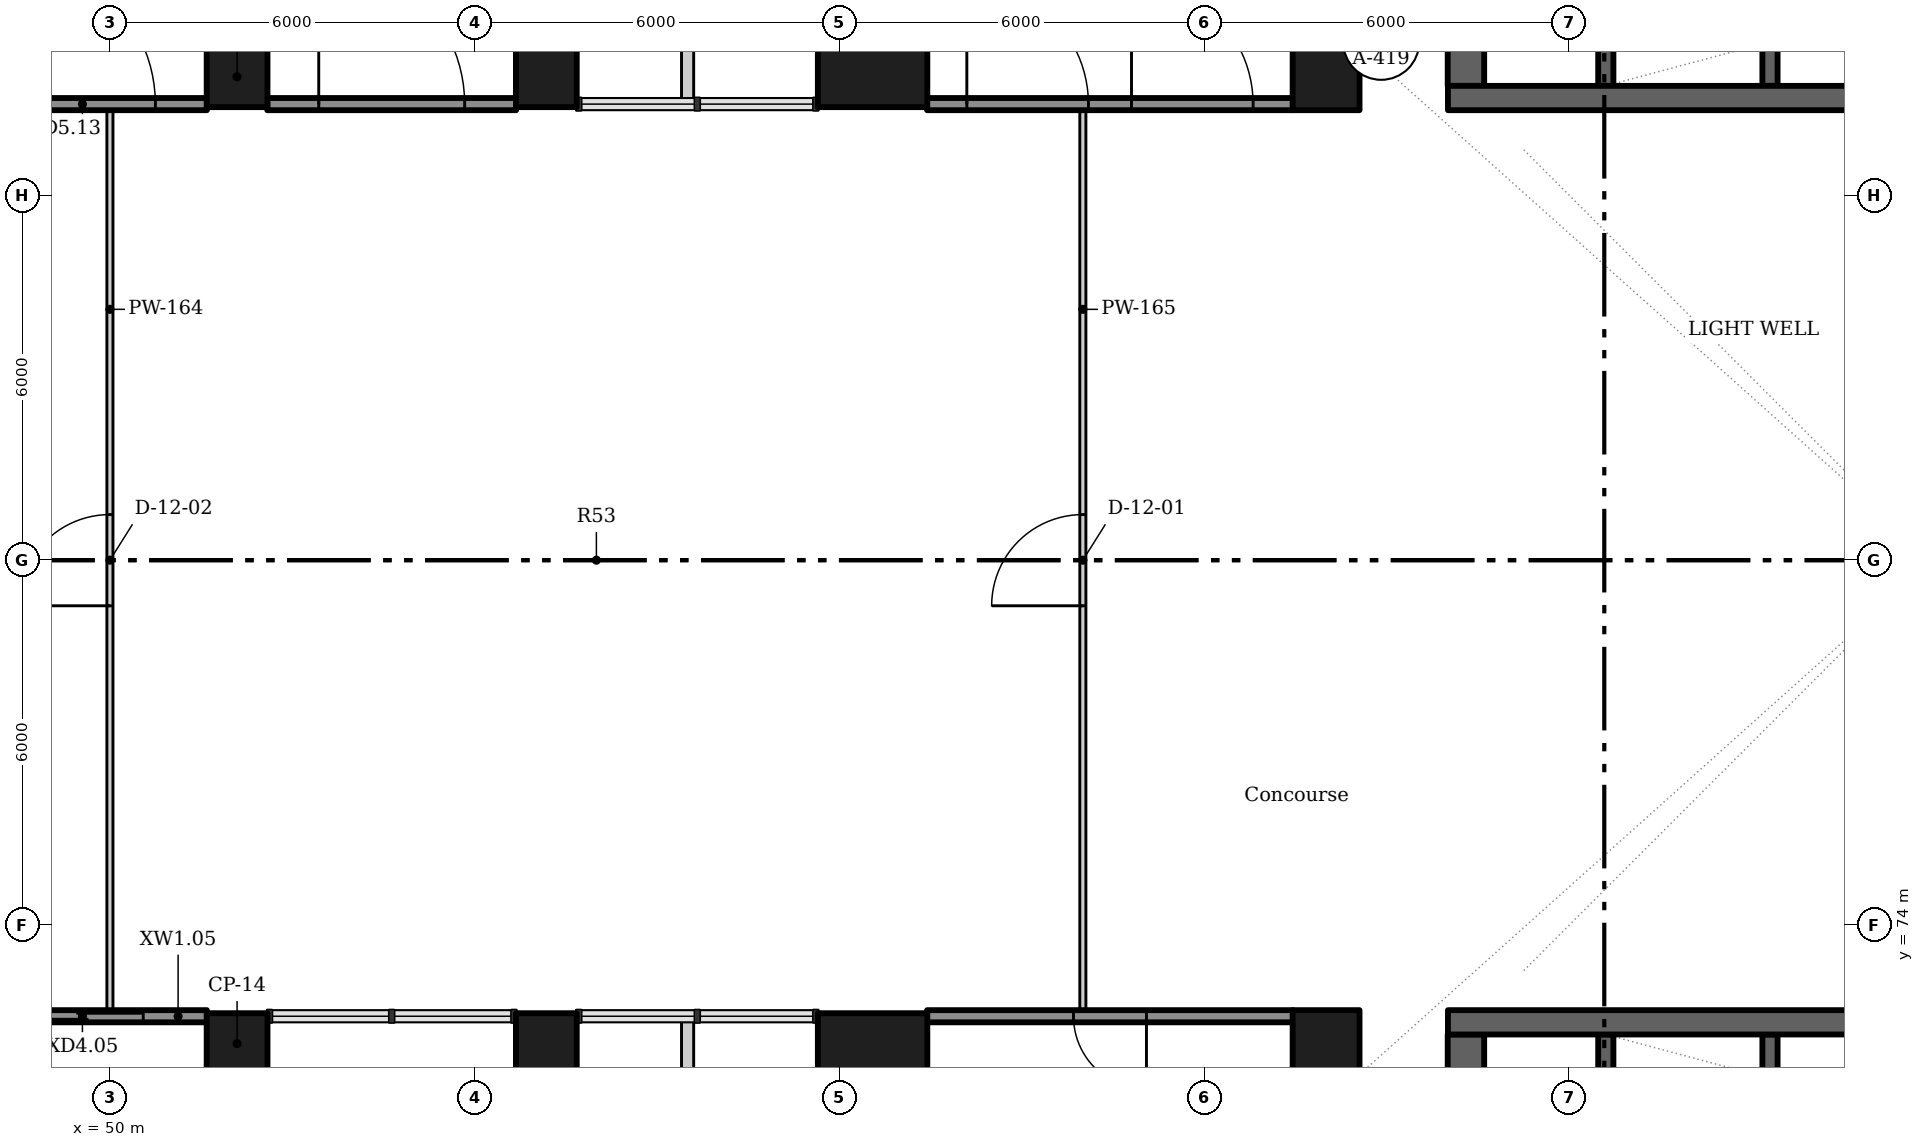
"""IFC4 building model, lengths in metres.
Left out: names, types, materials, properties, quantities, classifications, styles, units other than length and angle.
Written with IfcOpenShell. Run it as: python <this file> out.ifc"""

import sys

from ifc_helpers import new_model, si_unit, direction, frame, frame_2d, origin, origin_2d, place, context, subcontext, project, spatial, rectangle, extrude, element, fill, save


model = new_model("IFC4")
c1 = context("Model", 3, precision=1e-05, world=origin(), true_north=direction((0.0, 1.0)))
c2 = subcontext(c1, "Body", "Model", "MODEL_VIEW")
j1 = project(units=[si_unit("LENGTHUNIT", "METRE"), si_unit("PLANEANGLEUNIT", "RADIAN")], contexts=[c1])
p1 = place(None, origin())
s1 = spatial("IfcSite", under=j1, at=p1, CompositionType="ELEMENT")
p2 = place(p1, origin())
s2 = spatial("IfcBuilding", under=s1, at=p2, CompositionType="ELEMENT")
p3 = place(p2, origin())
s3 = spatial("IfcBuildingStorey", under=s2, at=p3, CompositionType="ELEMENT", Elevation=0.0)
for number, where, z_axis, x_axis in (
    (1, (70.0, 87.95, -1.8), (0.0, 0.0, 1.0), (0.0, -1.0, 0.0)),
    (2, (70.0, 72.05, -1.8), (0.0, 0.0, 1.0), (0.0, -1.0, 0.0)),
):
    element("IfcColumn", number, at=place(p3, frame(where, z_axis=z_axis, x_axis=x_axis)), inside=s3, PredefinedType="COLUMN", context=c2, shape_type="SweptSolid", body=[
        extrude(rectangle(XDim=1.1, YDim=1.1, at=origin_2d()), origin(), (0.0, 0.0, 1.0), 8.4),
    ])
for number, where, z_axis, x_axis in (
    (3, (62.542, 87.95, -1.8), (0.0, 0.0, 1.0), (1.0, 0.0, 0.0)),
    (4, (62.542, 72.05, -1.8), (0.0, 0.0, 1.0), (1.0, 0.0, 0.0)),
):
    element("IfcColumn", number, at=place(p3, frame(where, z_axis=z_axis, x_axis=x_axis)), inside=s3, PredefinedType="COLUMN", context=c2, shape_type="SweptSolid", body=[
        extrude(rectangle(XDim=1.8, YDim=1.0, at=origin_2d()), origin(), (0.0, 0.0, 1.0), 8.4),
    ])
for number, where, z_axis, x_axis in (
    (5, (57.177, 87.95, -1.8), (0.0, 0.0, 1.0), (1.0, 0.0, 0.0)),
    (6, (57.177, 72.05, -1.8), (0.0, 0.0, 1.0), (1.0, 0.0, 0.0)),
    (7, (52.091, 87.95, -1.8), (0.0, 0.0, 1.0), (1.0, 0.0, 0.0)),
    (8, (52.091, 72.05, -1.8), (0.0, 0.0, 1.0), (1.0, 0.0, 0.0)),
):
    element("IfcColumn", number, at=place(p3, frame(where, z_axis=z_axis, x_axis=x_axis)), inside=s3, PredefinedType="COLUMN", context=c2, shape_type="SweptSolid", body=[
        extrude(rectangle(XDim=1.0, YDim=1.0, at=origin_2d()), origin(), (0.0, 0.0, 1.0), 8.4),
    ])
p4 = place(p3, frame((69.454, 72.5, 0.0), z_axis=(0.0, 0.0, 1.0), x_axis=(-1.0, 0.0, 0.0)))
e9 = element("IfcWall", 9, at=p4, inside=s3, PredefinedType="SOLIDWALL", context=c2, shape_type="SweptSolid", body=[
    extrude(rectangle(XDim=6.016, YDim=0.2, at=frame_2d((3.008, 0.0))), origin(), (0.0, 0.0, 1.0), 5.4),
])
p5 = place(p4, frame((2.408, 0.0, 0.0)))
e10 = element("IfcOpeningElement", 10, at=p5, cuts=e9, PredefinedType="OPENING", context=c2, shape_type="SweptSolid", body=[
    extrude(rectangle(XDim=1.2, YDim=2.4, at=frame_2d((0.6, 1.2))), frame((0.0, 0.11, 0.0), z_axis=(0.0, -1.0, 0.0), x_axis=(1.0, 0.0, 0.0)), (0.0, 0.0, 1.0), 0.22),
])
p6 = place(p3, frame((51.595, 72.5, 0.0), z_axis=(0.0, 0.0, 1.0), x_axis=(-1.0, 0.0, 0.0)))
e11 = element("IfcWall", 11, at=p6, inside=s3, PredefinedType="SOLIDWALL", context=c2, shape_type="SweptSolid", body=[
    extrude(rectangle(XDim=4.095, YDim=0.2, at=frame_2d((2.047, 0.0))), origin(), (0.0, 0.0, 1.0), 5.4),
])
p7 = place(p6, frame((1.048, 0.0, 0.0)))
e12 = element("IfcOpeningElement", 12, at=p7, cuts=e11, PredefinedType="OPENING", context=c2, shape_type="SweptSolid", body=[
    extrude(rectangle(XDim=2.0, YDim=3.0, at=frame_2d((1.0, 1.5))), frame((0.0, 0.11, 0.0), z_axis=(0.0, -1.0, 0.0), x_axis=(1.0, 0.0, 0.0)), (0.0, 0.0, 1.0), 0.22),
])
p8 = place(p3, frame((47.5, 87.5, 0.0), z_axis=(0.0, 0.0, 1.0), x_axis=(1.0, 0.0, 0.0)))
e13 = element("IfcWall", 13, at=p8, inside=s3, PredefinedType="SOLIDWALL", context=c2, shape_type="SweptSolid", body=[
    extrude(rectangle(XDim=4.095, YDim=0.2, at=frame_2d((2.047, 0.0))), origin(), (0.0, 0.0, 1.0), 5.4),
])
p9 = place(p8, frame((0.847, 0.0, 0.0)))
e14 = element("IfcOpeningElement", 14, at=p9, cuts=e13, PredefinedType="OPENING", context=c2, shape_type="SweptSolid", body=[
    extrude(rectangle(XDim=2.4, YDim=2.7, at=frame_2d((1.2, 1.35))), frame((0.0, 0.11, 0.0), z_axis=(0.0, -1.0, 0.0), x_axis=(1.0, 0.0, 0.0)), (0.0, 0.0, 1.0), 0.22),
])
p10 = place(p3, frame((52.587, 87.5, 0.0), z_axis=(0.0, 0.0, 1.0), x_axis=(1.0, 0.0, 0.0)))
e15 = element("IfcWall", 15, at=p10, inside=s3, PredefinedType="SOLIDWALL", context=c2, shape_type="SweptSolid", body=[
    extrude(rectangle(XDim=4.094, YDim=0.2, at=frame_2d((2.047, 0.0))), origin(), (0.0, 0.0, 1.0), 5.4),
])
p11 = place(p10, frame((0.847, 0.0, 0.0)))
e16 = element("IfcOpeningElement", 16, at=p11, cuts=e15, PredefinedType="OPENING", context=c2, shape_type="SweptSolid", body=[
    extrude(rectangle(XDim=2.4, YDim=2.7, at=frame_2d((1.2, 1.35))), frame((0.0, 0.11, 0.0), z_axis=(0.0, -1.0, 0.0), x_axis=(1.0, 0.0, 0.0)), (0.0, 0.0, 1.0), 0.22),
])
p12 = place(p3, frame((63.438, 87.5, 0.0), z_axis=(0.0, 0.0, 1.0), x_axis=(1.0, 0.0, 0.0)))
e17 = element("IfcWall", 17, at=p12, inside=s3, PredefinedType="SOLIDWALL", context=c2, shape_type="SweptSolid", body=[
    extrude(rectangle(XDim=6.016, YDim=0.2, at=frame_2d((3.008, 0.0))), origin(), (0.0, 0.0, 1.0), 5.4),
])
p13 = place(p12, frame((0.654, 0.0, 0.0)))
e18 = element("IfcOpeningElement", 18, at=p13, cuts=e17, PredefinedType="OPENING", context=c2, shape_type="SweptSolid", body=[
    extrude(rectangle(XDim=2.0, YDim=2.4, at=frame_2d((1.0, 1.2))), frame((0.0, 0.11, 0.0), z_axis=(0.0, -1.0, 0.0), x_axis=(1.0, 0.0, 0.0)), (0.0, 0.0, 1.0), 0.22),
])
p14 = place(p12, frame((3.362, 0.0, 0.0)))
e19 = element("IfcOpeningElement", 19, at=p14, cuts=e17, PredefinedType="OPENING", context=c2, shape_type="SweptSolid", body=[
    extrude(rectangle(XDim=2.0, YDim=2.4, at=frame_2d((1.0, 1.2))), frame((0.0, 0.11, 0.0), z_axis=(0.0, -1.0, 0.0), x_axis=(1.0, 0.0, 0.0)), (0.0, 0.0, 1.0), 0.22),
])
p15 = place(p3, frame((74.6, 87.8, -1.8), z_axis=(0.0, 0.0, 1.0), x_axis=(0.0, 1.0, 0.0)))
e20 = element("IfcWall", 20, at=p15, inside=s3, PredefinedType="SHEAR", context=c2, shape_type="SweptSolid", body=[
    extrude(rectangle(XDim=2.9, YDim=0.25, at=frame_2d((1.45, 0.0))), origin(), (0.0, 0.0, 1.0), 8.1),
])
p16 = place(p3, frame((72.3, 96.9, -1.8), z_axis=(0.0, 0.0, 1.0), x_axis=(0.0, -1.0, 0.0)))
e21 = element("IfcWall", 21, at=p16, inside=s3, PredefinedType="SHEAR", context=c2, shape_type="SweptSolid", body=[
    extrude(rectangle(XDim=9.1, YDim=0.6, at=frame_2d((4.55, 0.0))), origin(), (0.0, 0.0, 1.0), 8.1),
])
p17 = place(p16, frame((0.85, 0.0, 1.8)))
e22 = element("IfcOpeningElement", 22, at=p17, cuts=e21, PredefinedType="OPENING", context=c2, shape_type="SweptSolid", body=[
    extrude(rectangle(XDim=1.1, YDim=2.1, at=frame_2d((0.55, 1.05))), frame((0.0, 0.31, 0.0), z_axis=(0.0, -1.0, 0.0), x_axis=(1.0, 0.0, 0.0)), (0.0, 0.0, 1.0), 0.62),
])
for number, where, z_axis, x_axis in (
    (23, (77.3, 87.8, -1.8), (0.0, 0.0, 1.0), (0.0, 1.0, 0.0)),
    (24, (74.6, 69.3, -1.8), (0.0, 0.0, 1.0), (0.0, 1.0, 0.0)),
):
    element("IfcWall", number, at=place(p3, frame(where, z_axis=z_axis, x_axis=x_axis)), inside=s3, PredefinedType="SHEAR", context=c2, shape_type="SweptSolid", body=[
        extrude(rectangle(XDim=2.9, YDim=0.25, at=frame_2d((1.45, 0.0))), origin(), (0.0, 0.0, 1.0), 8.1),
    ])
p18 = place(p3, frame((72.3, 72.2, -1.8), z_axis=(0.0, 0.0, 1.0), x_axis=(0.0, -1.0, 0.0)))
e25 = element("IfcWall", 25, at=p18, inside=s3, PredefinedType="SHEAR", context=c2, shape_type="SweptSolid", body=[
    extrude(rectangle(XDim=9.1, YDim=0.6, at=frame_2d((4.55, 0.0))), origin(), (0.0, 0.0, 1.0), 8.1),
])
p19 = place(p18, frame((7.15, 0.0, 1.8)))
e26 = element("IfcOpeningElement", 26, at=p19, cuts=e25, PredefinedType="OPENING", context=c2, shape_type="SweptSolid", body=[
    extrude(rectangle(XDim=1.1, YDim=2.1, at=frame_2d((0.55, 1.05))), frame((0.0, 0.31, 0.0), z_axis=(0.0, -1.0, 0.0), x_axis=(1.0, 0.0, 0.0)), (0.0, 0.0, 1.0), 0.62),
])
p20 = place(p18, frame((3.85, 0.0, 1.8)))
e27 = element("IfcOpeningElement", 27, at=p20, cuts=e25, PredefinedType="OPENING", context=c2, shape_type="SweptSolid", body=[
    extrude(rectangle(XDim=1.5, YDim=2.1, at=frame_2d((0.75, 1.05))), frame((0.0, 0.31, 0.0), z_axis=(0.0, -1.0, 0.0), x_axis=(1.0, 0.0, 0.0)), (0.0, 0.0, 1.0), 0.62),
])
p21 = place(p3, frame((77.3, 69.3, -1.8), z_axis=(0.0, 0.0, 1.0), x_axis=(0.0, 1.0, 0.0)))
e28 = element("IfcWall", 28, at=p21, inside=s3, PredefinedType="SHEAR", context=c2, shape_type="SweptSolid", body=[
    extrude(rectangle(XDim=2.9, YDim=0.25, at=frame_2d((1.45, 0.0))), origin(), (0.0, 0.0, 1.0), 8.1),
])
p22 = place(p3, frame((59.5, 72.42, 0.0), z_axis=(0.0, 0.0, 1.0), x_axis=(0.0, -1.0, 0.0)))
e29 = element("IfcWall", 29, at=p22, inside=s3, PredefinedType="PARTITIONING", context=c2, shape_type="SweptSolid", body=[
    extrude(rectangle(XDim=3.569, YDim=0.2, at=frame_2d((1.785, 0.0))), origin(), (0.0, 0.0, 1.0), 5.53),
])
p23 = place(p22, frame((1.343, 0.0, 0.0)))
e30 = element("IfcOpeningElement", 30, at=p23, cuts=e29, PredefinedType="OPENING", context=c2, shape_type="SweptSolid", body=[
    extrude(rectangle(XDim=1.0, YDim=2.1, at=frame_2d((0.5, 1.05))), frame((0.0, 0.11, 0.0), z_axis=(0.0, -1.0, 0.0), x_axis=(1.0, 0.0, 0.0)), (0.0, 0.0, 1.0), 0.22),
])
p24 = place(p3, frame((59.5, 91.149, 0.0), z_axis=(0.0, 0.0, 1.0), x_axis=(0.0, -1.0, 0.0)))
e31 = element("IfcWall", 31, at=p24, inside=s3, PredefinedType="PARTITIONING", context=c2, shape_type="SweptSolid", body=[
    extrude(rectangle(XDim=3.569, YDim=0.2, at=frame_2d((1.785, 0.0))), origin(), (0.0, 0.0, 1.0), 5.53),
])
p25 = place(p24, frame((1.226, 0.0, 0.0)))
e32 = element("IfcOpeningElement", 32, at=p25, cuts=e31, PredefinedType="OPENING", context=c2, shape_type="SweptSolid", body=[
    extrude(rectangle(XDim=1.0, YDim=2.1, at=frame_2d((0.5, 1.05))), frame((0.0, 0.11, 0.0), z_axis=(0.0, -1.0, 0.0), x_axis=(1.0, 0.0, 0.0)), (0.0, 0.0, 1.0), 0.22),
])
p26 = place(p3, frame((50.0, 72.6, 0.0), z_axis=(0.0, 0.0, 1.0), x_axis=(0.0, 1.0, 0.0)))
e33 = element("IfcWall", 33, at=p26, inside=s3, PredefinedType="PARTITIONING", context=c2, shape_type="SweptSolid", body=[
    extrude(rectangle(XDim=14.8, YDim=0.1, at=frame_2d((7.4, 0.0))), origin(), (0.0, 0.0, 1.0), 6.3),
])
p27 = place(p26, frame((6.65, 0.0, 0.0)))
e34 = element("IfcOpeningElement", 34, at=p27, cuts=e33, PredefinedType="OPENING", context=c2, shape_type="SweptSolid", body=[
    extrude(rectangle(XDim=1.5, YDim=2.1, at=frame_2d((0.75, 1.05))), frame((0.0, 0.06, 0.0), z_axis=(0.0, -1.0, 0.0), x_axis=(1.0, 0.0, 0.0)), (0.0, 0.0, 1.0), 0.12),
])
p28 = place(p3, frame((66.0, 72.6, 0.0), z_axis=(0.0, 0.0, 1.0), x_axis=(0.0, 1.0, 0.0)))
e35 = element("IfcWall", 35, at=p28, inside=s3, PredefinedType="PARTITIONING", context=c2, shape_type="SweptSolid", body=[
    extrude(rectangle(XDim=14.8, YDim=0.1, at=frame_2d((7.4, 0.0))), origin(), (0.0, 0.0, 1.0), 6.3),
])
p29 = place(p28, frame((6.65, 0.0, 0.0)))
e36 = element("IfcOpeningElement", 36, at=p29, cuts=e35, PredefinedType="OPENING", context=c2, shape_type="SweptSolid", body=[
    extrude(rectangle(XDim=1.5, YDim=2.1, at=frame_2d((0.75, 1.05))), frame((0.0, 0.06, 0.0), z_axis=(0.0, -1.0, 0.0), x_axis=(1.0, 0.0, 0.0)), (0.0, 0.0, 1.0), 0.12),
])
for number, where, z_axis, x_axis in (
    (37, (72.004, 87.6, -1.8), (0.0, 0.0, 1.0), (1.0, 0.0, 0.0)),
    (38, (72.004, 72.4, -1.8), (0.0, 0.0, 1.0), (1.0, 0.0, 0.0)),
):
    element("IfcWall", number, at=place(p3, frame(where, z_axis=z_axis, x_axis=x_axis)), inside=s3, PredefinedType="SHEAR", context=c2, shape_type="SweptSolid", body=[
        extrude(rectangle(XDim=15.992, YDim=0.4, at=frame_2d((7.996, 0.0))), origin(), (0.0, 0.0, 1.0), 8.1),
    ])
p30 = place(p5, origin())
e39 = element("IfcDoor", 39, at=p30, inside=s3, OperationType="SINGLE_SWING_LEFT", PredefinedType="DOOR", context=c2, shape_type="SweptSolid", body=[
    extrude(rectangle(XDim=1.2, YDim=2.4, at=frame_2d((0.6, 1.2))), frame((0.0, 0.025, 0.0), z_axis=(0.0, -1.0, 0.0), x_axis=(1.0, 0.0, 0.0)), (0.0, 0.0, 1.0), 0.05),
])
fill(e10, e39)
p31 = place(p7, origin())
e40 = element("IfcDoor", 40, at=p31, inside=s3, OperationType="ROLLINGUP", PredefinedType="GATE", context=c2, shape_type="SweptSolid", body=[
    extrude(rectangle(XDim=2.0, YDim=3.0, at=frame_2d((1.0, 1.5))), frame((0.0, 0.025, 0.0), z_axis=(0.0, -1.0, 0.0), x_axis=(1.0, 0.0, 0.0)), (0.0, 0.0, 1.0), 0.05),
])
fill(e12, e40)
p32 = place(p9, origin())
e41 = element("IfcDoor", 41, at=p32, inside=s3, OperationType="DOUBLE_DOOR_DOUBLE_SWING", PredefinedType="DOOR", context=c2, shape_type="SweptSolid", body=[
    extrude(rectangle(XDim=2.4, YDim=2.7, at=frame_2d((1.2, 1.35))), frame((0.0, 0.025, 0.0), z_axis=(0.0, -1.0, 0.0), x_axis=(1.0, 0.0, 0.0)), (0.0, 0.0, 1.0), 0.05),
])
fill(e14, e41)
p33 = place(p11, origin())
e42 = element("IfcDoor", 42, at=p33, inside=s3, OperationType="DOUBLE_DOOR_DOUBLE_SWING", PredefinedType="DOOR", context=c2, shape_type="SweptSolid", body=[
    extrude(rectangle(XDim=2.4, YDim=2.7, at=frame_2d((1.2, 1.35))), frame((0.0, 0.025, 0.0), z_axis=(0.0, -1.0, 0.0), x_axis=(1.0, 0.0, 0.0)), (0.0, 0.0, 1.0), 0.05),
])
fill(e16, e42)
p34 = place(p13, origin())
e43 = element("IfcDoor", 43, at=p34, inside=s3, OperationType="DOUBLE_DOOR_DOUBLE_SWING", PredefinedType="DOOR", context=c2, shape_type="SweptSolid", body=[
    extrude(rectangle(XDim=2.0, YDim=2.4, at=frame_2d((1.0, 1.2))), frame((0.0, 0.025, 0.0), z_axis=(0.0, -1.0, 0.0), x_axis=(1.0, 0.0, 0.0)), (0.0, 0.0, 1.0), 0.05),
])
fill(e18, e43)
p35 = place(p14, origin())
e44 = element("IfcDoor", 44, at=p35, inside=s3, OperationType="DOUBLE_DOOR_DOUBLE_SWING", PredefinedType="DOOR", context=c2, shape_type="SweptSolid", body=[
    extrude(rectangle(XDim=2.0, YDim=2.4, at=frame_2d((1.0, 1.2))), frame((0.0, 0.025, 0.0), z_axis=(0.0, -1.0, 0.0), x_axis=(1.0, 0.0, 0.0)), (0.0, 0.0, 1.0), 0.05),
])
fill(e19, e44)
p36 = place(p29, origin())
e45 = element("IfcDoor", 45, at=p36, inside=s3, OperationType="DOUBLE_DOOR_SINGLE_SWING", PredefinedType="DOOR", context=c2, shape_type="SweptSolid", body=[
    extrude(rectangle(XDim=1.5, YDim=2.1, at=frame_2d((0.75, 1.05))), frame((0.0, 0.025, 0.0), z_axis=(0.0, -1.0, 0.0), x_axis=(1.0, 0.0, 0.0)), (0.0, 0.0, 1.0), 0.05),
])
fill(e36, e45)
p37 = place(p27, origin())
e46 = element("IfcDoor", 46, at=p37, inside=s3, OperationType="DOUBLE_DOOR_SINGLE_SWING", PredefinedType="DOOR", context=c2, shape_type="SweptSolid", body=[
    extrude(rectangle(XDim=1.5, YDim=2.1, at=frame_2d((0.75, 1.05))), frame((0.0, 0.025, 0.0), z_axis=(0.0, -1.0, 0.0), x_axis=(1.0, 0.0, 0.0)), (0.0, 0.0, 1.0), 0.05),
])
fill(e34, e46)
save(model, sys.argv[1])
